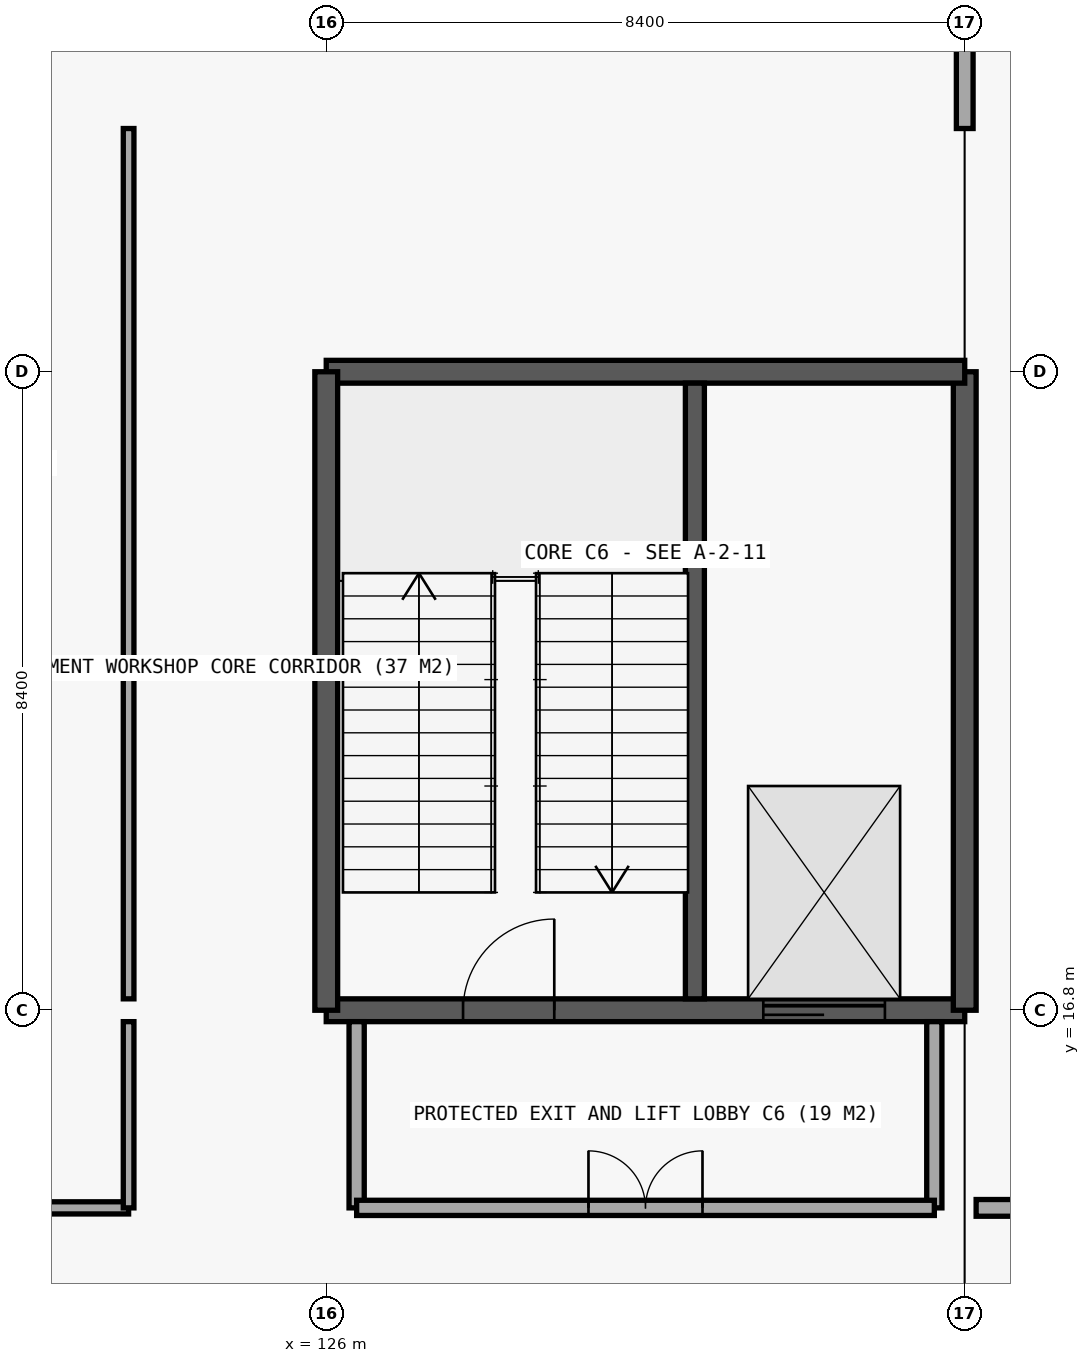
"""IFC4 building model, lengths in metres.
Left out: names, types, materials, properties, quantities, classifications, styles, units other than length and angle.
Written with IfcOpenShell. Run it as: python <this file> out.ifc"""

import sys

from ifc_helpers import new_model, si_unit, direction, frame, frame_2d, origin, place, context, subcontext, project, spatial, rectangle, extrude, element, fill, save


model = new_model("IFC4")
c1 = context("Model", 3, precision=1e-05, world=origin(), true_north=direction((0.0, 1.0)))
c2 = subcontext(c1, "Body", "Model", "MODEL_VIEW")
j1 = project(units=[si_unit("LENGTHUNIT", "METRE"), si_unit("PLANEANGLEUNIT", "RADIAN")], contexts=[c1])
p1 = place(None, origin())
s1 = spatial("IfcSite", under=j1, at=p1, CompositionType="ELEMENT")
p2 = place(p1, origin())
s2 = spatial("IfcBuilding", under=s1, at=p2, CompositionType="ELEMENT")
p3 = place(p2, frame((0.0, 0.0, -4.5)))
s3 = spatial("IfcBuildingStorey", under=s2, at=p3, CompositionType="ELEMENT", Elevation=-4.5)
p4 = place(p3, frame((126.0, 16.8, -0.35), z_axis=(0.0, 0.0, 1.0), x_axis=(1.0, 0.0, 0.0)))
e1 = element("IfcWall", 1, at=p4, inside=s3, PredefinedType="SHEAR", context=c2, shape_type="SweptSolid", body=[
    extrude(rectangle(XDim=8.4, YDim=0.3, at=frame_2d((4.2, 0.0))), origin(), (0.0, 0.0, 1.0), 4.85),
])
p5 = place(p4, frame((1.8, 0.0, 0.35)))
e2 = element("IfcOpeningElement", 2, at=p5, cuts=e1, PredefinedType="OPENING", context=c2, shape_type="SweptSolid", body=[
    extrude(rectangle(XDim=1.2, YDim=2.2, at=frame_2d((0.6, 1.1))), frame((0.0, 0.16, 0.0), z_axis=(0.0, -1.0, 0.0), x_axis=(1.0, 0.0, 0.0)), (0.0, 0.0, 1.0), 0.32),
])
p6 = place(p4, frame((5.75, 0.0, 0.35)))
e3 = element("IfcOpeningElement", 3, at=p6, cuts=e1, PredefinedType="OPENING", context=c2, shape_type="SweptSolid", body=[
    extrude(rectangle(XDim=1.6, YDim=2.4, at=frame_2d((0.8, 1.2))), frame((0.0, 0.16, 0.0), z_axis=(0.0, -1.0, 0.0), x_axis=(1.0, 0.0, 0.0)), (0.0, 0.0, 1.0), 0.32),
])
for number, where, z_axis, x_axis in (
    (4, (134.4, 16.8, -0.35), (0.0, 0.0, 1.0), (0.0, 1.0, 0.0)),
    (5, (134.4, 25.2, -0.35), (0.0, 0.0, 1.0), (-1.0, 0.0, 0.0)),
    (6, (126.0, 25.2, -0.35), (0.0, 0.0, 1.0), (0.0, -1.0, 0.0)),
):
    element("IfcWall", number, at=place(p3, frame(where, z_axis=z_axis, x_axis=x_axis)), inside=s3, PredefinedType="SHEAR", context=c2, shape_type="SweptSolid", body=[
        extrude(rectangle(XDim=8.4, YDim=0.3, at=frame_2d((4.2, 0.0))), origin(), (0.0, 0.0, 1.0), 4.85),
    ])
p7 = place(p3, frame((130.85, 16.95, -0.35), z_axis=(0.0, 0.0, 1.0), x_axis=(0.0, 1.0, 0.0)))
e7 = element("IfcWall", 7, at=p7, inside=s3, PredefinedType="SHEAR", context=c2, shape_type="SweptSolid", body=[
    extrude(rectangle(XDim=8.1, YDim=0.25, at=frame_2d((4.05, 0.0))), origin(), (0.0, 0.0, 1.0), 4.85),
])
for number, where, z_axis, x_axis in (
    (8, (126.4, 14.2, 0.0), (0.0, 0.0, 1.0), (0.0, 1.0, 0.0)),
    (9, (134.0, 14.2, 0.0), (0.0, 0.0, 1.0), (0.0, 1.0, 0.0)),
):
    element("IfcWall", number, at=place(p3, frame(where, z_axis=z_axis, x_axis=x_axis)), inside=s3, PredefinedType="PARTITIONING", context=c2, shape_type="SweptSolid", body=[
        extrude(rectangle(XDim=2.45, YDim=0.2, at=frame_2d((1.225, 0.0))), origin(), (0.0, 0.0, 1.0), 3.82),
    ])
p8 = place(p3, frame((126.4, 14.2, 0.0), z_axis=(0.0, 0.0, 1.0), x_axis=(1.0, 0.0, 0.0)))
e10 = element("IfcWall", 10, at=p8, inside=s3, PredefinedType="PARTITIONING", context=c2, shape_type="SweptSolid", body=[
    extrude(rectangle(XDim=7.6, YDim=0.2, at=frame_2d((3.8, 0.0))), origin(), (0.0, 0.0, 1.0), 3.81),
])
p9 = place(p8, frame((3.05, 0.0, 0.0)))
e11 = element("IfcOpeningElement", 11, at=p9, cuts=e10, PredefinedType="OPENING", context=c2, shape_type="SweptSolid", body=[
    extrude(rectangle(XDim=1.5, YDim=2.2, at=frame_2d((0.75, 1.1))), frame((0.0, 0.11, 0.0), z_axis=(0.0, -1.0, 0.0), x_axis=(1.0, 0.0, 0.0)), (0.0, 0.0, 1.0), 0.22),
])
p10 = place(p3, frame((109.2, 14.2, 0.0), z_axis=(0.0, 0.0, 1.0), x_axis=(1.0, 0.0, 0.0)))
e12 = element("IfcWall", 12, at=p10, inside=s3, PredefinedType="PARTITIONING", context=c2, shape_type="SweptSolid", body=[
    extrude(rectangle(XDim=14.2, YDim=0.16, at=frame_2d((7.1, 0.0))), origin(), (0.0, 0.0, 1.0), 3.8),
])
p11 = place(p10, frame((6.4, 0.0, 0.0)))
e13 = element("IfcOpeningElement", 13, at=p11, cuts=e12, PredefinedType="OPENING", context=c2, shape_type="SweptSolid", body=[
    extrude(rectangle(XDim=1.4, YDim=2.25, at=frame_2d((0.7, 1.125))), frame((0.0, 0.09, 0.0), z_axis=(0.0, -1.0, 0.0), x_axis=(1.0, 0.0, 0.0)), (0.0, 0.0, 1.0), 0.18),
])
p12 = place(p3, frame((134.55, 14.2, 0.0), z_axis=(0.0, 0.0, 1.0), x_axis=(1.0, 0.0, 0.0)))
e14 = element("IfcWall", 14, at=p12, inside=s3, PredefinedType="PARTITIONING", context=c2, shape_type="SweptSolid", body=[
    extrude(rectangle(XDim=33.27, YDim=0.22, at=frame_2d((16.635, 0.0))), origin(), (0.0, 0.0, 1.0), 3.8),
])
p13 = place(p12, frame((16.01, 0.0, 0.0)))
e15 = element("IfcOpeningElement", 15, at=p13, cuts=e14, PredefinedType="OPENING", context=c2, shape_type="SweptSolid", body=[
    extrude(rectangle(XDim=1.25, YDim=2.2, at=frame_2d((0.625, 1.1))), frame((0.0, 0.12, 0.0), z_axis=(0.0, -1.0, 0.0), x_axis=(1.0, 0.0, 0.0)), (0.0, 0.0, 1.0), 0.24),
])
p14 = place(p3, frame((123.4, 14.2, 0.0), z_axis=(0.0, 0.0, 1.0), x_axis=(0.0, 1.0, 0.0)))
e16 = element("IfcWall", 16, at=p14, inside=s3, PredefinedType="PARTITIONING", context=c2, shape_type="SweptSolid", body=[
    extrude(rectangle(XDim=2.45, YDim=0.14, at=frame_2d((1.225, 0.0))), origin(), (0.0, 0.0, 1.0), 3.8),
])
p15 = place(p3, frame((123.4, 16.95, 0.0), z_axis=(0.0, 0.0, 1.0), x_axis=(0.0, 1.0, 0.0)))
e17 = element("IfcWall", 17, at=p15, inside=s3, PredefinedType="PARTITIONING", context=c2, shape_type="SweptSolid", body=[
    extrude(rectangle(XDim=11.45, YDim=0.14, at=frame_2d((5.725, 0.0))), origin(), (0.0, 0.0, 1.0), 3.8),
])
p16 = place(p3, frame((134.4, 28.4, 0.0), z_axis=(0.0, 0.0, 1.0), x_axis=(0.0, 1.0, 0.0)))
e18 = element("IfcWall", 18, at=p16, inside=s3, PredefinedType="PARTITIONING", context=c2, shape_type="SweptSolid", body=[
    extrude(rectangle(XDim=21.82, YDim=0.22, at=frame_2d((10.91, 0.0))), origin(), (0.0, 0.0, 1.0), 3.57),
])
p17 = place(p16, frame((10.41, 0.0, 0.0)))
e19 = element("IfcOpeningElement", 19, at=p17, cuts=e18, PredefinedType="OPENING", context=c2, shape_type="SweptSolid", body=[
    extrude(rectangle(XDim=1.0, YDim=2.15, at=frame_2d((0.5, 1.075))), frame((0.0, 0.12, 0.0), z_axis=(0.0, -1.0, 0.0), x_axis=(1.0, 0.0, 0.0)), (0.0, 0.0, 1.0), 0.24),
])
p18 = place(p5, origin())
e20 = element("IfcDoor", 20, at=p18, inside=s3, OperationType="SINGLE_SWING_RIGHT", PredefinedType="DOOR", context=c2, shape_type="SweptSolid", body=[
    extrude(rectangle(XDim=1.2, YDim=2.2, at=frame_2d((0.6, 1.1))), frame((0.0, 0.025, 0.0), z_axis=(0.0, -1.0, 0.0), x_axis=(1.0, 0.0, 0.0)), (0.0, 0.0, 1.0), 0.05),
])
fill(e2, e20)
p19 = place(p6, origin())
e21 = element("IfcDoor", 21, at=p19, inside=s3, OperationType="SLIDING_TO_LEFT", PredefinedType="DOOR", context=c2, shape_type="SweptSolid", body=[
    extrude(rectangle(XDim=1.6, YDim=2.4, at=frame_2d((0.8, 1.2))), frame((0.0, 0.025, 0.0), z_axis=(0.0, -1.0, 0.0), x_axis=(1.0, 0.0, 0.0)), (0.0, 0.0, 1.0), 0.05),
])
fill(e3, e21)
p20 = place(p9, origin())
e22 = element("IfcDoor", 22, at=p20, inside=s3, OperationType="DOUBLE_DOOR_SINGLE_SWING", PredefinedType="DOOR", context=c2, shape_type="SweptSolid", body=[
    extrude(rectangle(XDim=1.5, YDim=2.2, at=frame_2d((0.75, 1.1))), frame((0.0, 0.025, 0.0), z_axis=(0.0, -1.0, 0.0), x_axis=(1.0, 0.0, 0.0)), (0.0, 0.0, 1.0), 0.05),
])
fill(e11, e22)
save(model, sys.argv[1])
